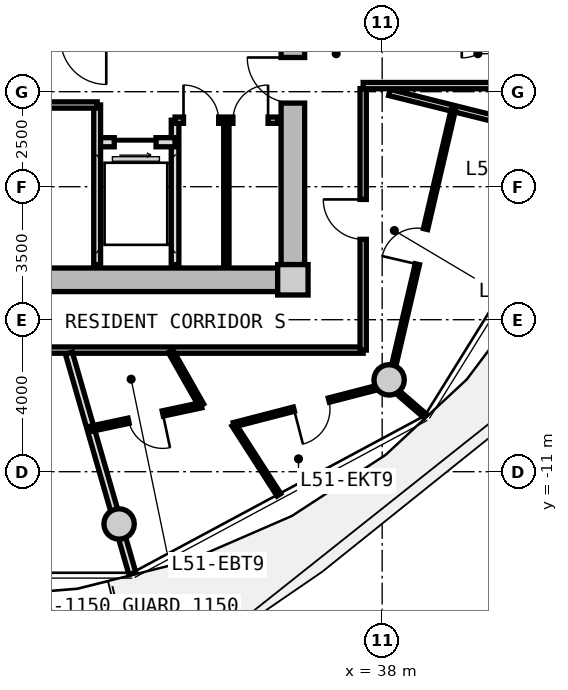
"""IFC4 building model, lengths in metres.
Left out: names, types, materials, properties, quantities, classifications, styles, units other than length and angle.
Written with IfcOpenShell. Run it as: python <this file> out.ifc"""

import sys

from ifc_helpers import new_model, si_unit, direction, frame, frame_2d, origin, origin_2d, place, context, subcontext, project, spatial, rectangle, circle, extrude, source, transform, mapped, element, fill, save


model = new_model("IFC4")
c1 = context("Model", 3, precision=1e-05, world=origin(), true_north=direction((0.0, 1.0)))
c2 = subcontext(c1, "Body", "Model", "MODEL_VIEW")
j1 = project(units=[si_unit("LENGTHUNIT", "METRE"), si_unit("PLANEANGLEUNIT", "RADIAN")], contexts=[c1])
p1 = place(None, origin())
s1 = spatial("IfcSite", under=j1, at=p1, CompositionType="ELEMENT")
p2 = place(p1, origin())
s2 = spatial("IfcBuilding", under=s1, at=p2, CompositionType="ELEMENT")
p3 = place(p2, frame((0.0, 0.0, 164.8)))
s3 = spatial("IfcBuildingStorey", under=s2, at=p3, CompositionType="ELEMENT", Elevation=164.8)
m1 = source(origin(), c2, "Body", "SweptSolid", [
    extrude(rectangle(XDim=0.8, YDim=0.8, at=origin_2d()), origin(), (0.0, 0.0, 1.0), 3.05),
])
p4 = place(p3, frame((35.65, -5.95, 0.0), z_axis=(0.0, 0.0, 1.0), x_axis=(1.0, 0.0, 0.0)))
e1 = element("IfcColumn", 1, at=p4, inside=s3, PredefinedType="COLUMN", context=c2, shape_type="MappedRepresentation", body=[
    mapped(m1, transform((0.0, 0.0, 0.0), x_axis=(1.0, 0.0, 0.0), y_axis=(0.0, 1.0, 0.0), z_axis=(0.0, 0.0, 1.0), scale=1.0)),
])
m2 = source(origin(), c2, "Body", "SweptSolid", [
    extrude(rectangle(XDim=14.5, YDim=0.62, at=frame_2d((7.25, 0.0))), origin(), (0.0, 0.0, 1.0), 2.81),
])
p5 = place(p3, frame((35.25, -5.95, 0.0), z_axis=(0.0, 0.0, 1.0), x_axis=(-1.0, 0.0, 0.0)))
e2 = element("IfcWall", 2, at=p5, inside=s3, PredefinedType="SHEAR", context=c2, shape_type="MappedRepresentation", body=[
    mapped(m2, transform((0.0, 0.0, 0.0), x_axis=(1.0, 0.0, 0.0), y_axis=(0.0, 1.0, 0.0), z_axis=(0.0, 0.0, 1.0), scale=1.0)),
])
m3 = source(origin(), c2, "Body", "SweptSolid", [
    extrude(rectangle(XDim=11.1, YDim=0.62, at=frame_2d((5.55, 0.0))), origin(), (0.0, 0.0, 1.0), 2.81),
])
p6 = place(p3, frame((35.65, 5.55, 0.0), z_axis=(0.0, 0.0, 1.0), x_axis=(0.0, -1.0, 0.0)))
e3 = element("IfcWall", 3, at=p6, inside=s3, PredefinedType="SHEAR", context=c2, shape_type="MappedRepresentation", body=[
    mapped(m3, transform((0.0, 0.0, 0.0), x_axis=(1.0, 0.0, 0.0), y_axis=(0.0, 1.0, 0.0), z_axis=(0.0, 0.0, 1.0), scale=1.0)),
])
p7 = place(p6, frame((5.65, 0.0, 0.0)))
e4 = element("IfcOpeningElement", 4, at=p7, cuts=e3, PredefinedType="OPENING", context=c2, shape_type="SweptSolid", body=[
    extrude(rectangle(XDim=1.2, YDim=2.15, at=frame_2d((0.6, 1.075))), frame((0.0, 0.32, 0.0), z_axis=(0.0, -1.0, 0.0), x_axis=(1.0, 0.0, 0.0)), (0.0, 0.0, 1.0), 0.64),
])
m4 = source(origin(), c2, "Body", "SweptSolid", [
    extrude(circle(Radius=0.4, at=origin_2d()), origin(), (0.0, 0.0, 1.0), 3.05),
])
for number, where, z_axis, x_axis in (
    (5, (31.077, -12.375, 0.0), (0.0, 0.0, 1.0), (1.0, 0.0, 0.0)),
    (6, (38.183, -8.584, 0.0), (0.0, 0.0, 1.0), (1.0, 0.0, 0.0)),
):
    element("IfcColumn", number, at=place(p3, frame(where, z_axis=z_axis, x_axis=x_axis)), inside=s3, PredefinedType="COLUMN", context=c2, shape_type="MappedRepresentation", body=[
        mapped(m4, transform((0.0, 0.0, 0.0), x_axis=(1.0, 0.0, 0.0), y_axis=(0.0, 1.0, 0.0), z_axis=(0.0, 0.0, 1.0), scale=1.0)),
    ])
m5 = source(origin(), c2, "Body", "SweptSolid", [
    extrude(rectangle(XDim=3.8, YDim=0.2, at=frame_2d((1.9, 0.0))), origin(), (0.0, 0.0, 1.0), 2.795),
])
p8 = place(p3, frame((32.55, -5.55, 0.0), z_axis=(0.0, 0.0, 1.0), x_axis=(0.0, 1.0, 0.0)))
e7 = element("IfcWall", 7, at=p8, inside=s3, PredefinedType="PARTITIONING", context=c2, shape_type="MappedRepresentation", body=[
    mapped(m5, transform((0.0, 0.0, 0.0), x_axis=(1.0, 0.0, 0.0), y_axis=(0.0, 1.0, 0.0), z_axis=(0.0, 0.0, 1.0), scale=1.0)),
])
m6 = source(origin(), c2, "Body", "SweptSolid", [
    extrude(rectangle(XDim=2.05, YDim=0.24, at=frame_2d((1.025, 0.0))), origin(), (0.0, 0.0, 1.0), 2.795),
])
p9 = place(p3, frame((30.5, -2.33, 0.0), z_axis=(0.0, 0.0, 1.0), x_axis=(1.0, 0.0, 0.0)))
e8 = element("IfcWall", 8, at=p9, inside=s3, PredefinedType="PARTITIONING", context=c2, shape_type="MappedRepresentation", body=[
    mapped(m6, transform((0.0, 0.0, 0.0), x_axis=(1.0, 0.0, 0.0), y_axis=(0.0, 1.0, 0.0), z_axis=(0.0, 0.0, 1.0), scale=1.0)),
])
p10 = place(p9, frame((0.45, 0.0, 0.0)))
e9 = element("IfcOpeningElement", 9, at=p10, cuts=e8, PredefinedType="OPENING", context=c2, shape_type="SweptSolid", body=[
    extrude(rectangle(XDim=1.1, YDim=2.2, at=frame_2d((0.55, 1.1))), frame((0.0, 0.13, 0.0), z_axis=(0.0, -1.0, 0.0), x_axis=(1.0, 0.0, 0.0)), (0.0, 0.0, 1.0), 0.26),
])
m7 = source(origin(), c2, "Body", "SweptSolid", [
    extrude(rectangle(XDim=4.2, YDim=0.18, at=frame_2d((2.1, 0.0))), origin(), (0.0, 0.0, 1.0), 2.795),
])
p11 = place(p3, frame((30.5, -5.55, 0.0), z_axis=(0.0, 0.0, 1.0), x_axis=(0.0, 1.0, 0.0)))
e10 = element("IfcWall", 10, at=p11, inside=s3, PredefinedType="PARTITIONING", context=c2, shape_type="MappedRepresentation", body=[
    mapped(m7, transform((0.0, 0.0, 0.0), x_axis=(1.0, 0.0, 0.0), y_axis=(0.0, 1.0, 0.0), z_axis=(0.0, 0.0, 1.0), scale=1.0)),
])
m8 = source(origin(), c2, "Body", "SweptSolid", [
    extrude(rectangle(XDim=4.77, YDim=0.165, at=frame_2d((2.385, 0.0))), origin(), (0.0, 0.0, 1.0), 2.795),
])
p12 = place(p3, frame((25.73, -1.35, 0.0), z_axis=(0.0, 0.0, 1.0), x_axis=(1.0, 0.0, 0.0)))
e11 = element("IfcWall", 11, at=p12, inside=s3, PredefinedType="PARTITIONING", context=c2, shape_type="MappedRepresentation", body=[
    mapped(m8, transform((0.0, 0.0, 0.0), x_axis=(1.0, 0.0, 0.0), y_axis=(0.0, 1.0, 0.0), z_axis=(0.0, 0.0, 1.0), scale=1.0)),
])
p13 = place(p12, frame((1.85, 0.0, 0.0)))
e12 = element("IfcOpeningElement", 12, at=p13, cuts=e11, PredefinedType="OPENING", context=c2, shape_type="SweptSolid", body=[
    extrude(rectangle(XDim=1.0, YDim=2.1, at=frame_2d((0.5, 1.05))), frame((0.0, 0.093, 0.0), z_axis=(0.0, -1.0, 0.0), x_axis=(1.0, 0.0, 0.0)), (0.0, 0.0, 1.0), 0.185),
])
m9 = source(origin(), c2, "Body", "SweptSolid", [
    extrude(rectangle(XDim=2.7, YDim=0.165, at=frame_2d((1.35, 0.0))), origin(), (0.0, 0.0, 1.0), 2.795),
])
p14 = place(p3, frame((32.55, -1.75, 0.0), z_axis=(0.0, 0.0, 1.0), x_axis=(1.0, 0.0, 0.0)))
e13 = element("IfcWall", 13, at=p14, inside=s3, PredefinedType="PARTITIONING", context=c2, shape_type="MappedRepresentation", body=[
    mapped(m9, transform((0.0, 0.0, 0.0), x_axis=(1.0, 0.0, 0.0), y_axis=(0.0, 1.0, 0.0), z_axis=(0.0, 0.0, 1.0), scale=1.0)),
])
p15 = place(p14, frame((0.222, 0.0, 0.0)))
e14 = element("IfcOpeningElement", 14, at=p15, cuts=e13, PredefinedType="OPENING", context=c2, shape_type="SweptSolid", body=[
    extrude(rectangle(XDim=0.925, YDim=2.1, at=frame_2d((0.462, 1.05))), frame((0.0, 0.093, 0.0), z_axis=(0.0, -1.0, 0.0), x_axis=(1.0, 0.0, 0.0)), (0.0, 0.0, 1.0), 0.185),
])
p16 = place(p14, frame((1.522, 0.0, 0.0)))
e15 = element("IfcOpeningElement", 15, at=p16, cuts=e13, PredefinedType="OPENING", context=c2, shape_type="SweptSolid", body=[
    extrude(rectangle(XDim=0.925, YDim=2.1, at=frame_2d((0.462, 1.05))), frame((0.0, 0.093, 0.0), z_axis=(0.0, -1.0, 0.0), x_axis=(1.0, 0.0, 0.0)), (0.0, 0.0, 1.0), 0.185),
])
m10 = source(origin(), c2, "Body", "SweptSolid", [
    extrude(rectangle(XDim=3.8, YDim=0.14, at=frame_2d((1.9, 0.0))), origin(), (0.0, 0.0, 1.0), 2.795),
])
p17 = place(p3, frame((33.9, -5.55, 0.0), z_axis=(0.0, 0.0, 1.0), x_axis=(0.0, 1.0, 0.0)))
e16 = element("IfcWall", 16, at=p17, inside=s3, PredefinedType="PARTITIONING", context=c2, shape_type="MappedRepresentation", body=[
    mapped(m10, transform((0.0, 0.0, 0.0), x_axis=(1.0, 0.0, 0.0), y_axis=(0.0, 1.0, 0.0), z_axis=(0.0, 0.0, 1.0), scale=1.0)),
])
m11 = source(origin(), c2, "Body", "SweptSolid", [
    extrude(rectangle(XDim=19.0, YDim=0.165, at=frame_2d((9.5, 0.0))), origin(), (0.0, 0.0, 1.0), 2.795),
])
p18 = place(p3, frame((37.5, -7.8, 0.0), z_axis=(0.0, 0.0, 1.0), x_axis=(-1.0, 0.0, 0.0)))
e17 = element("IfcWall", 17, at=p18, inside=s3, PredefinedType="PARTITIONING", context=c2, shape_type="MappedRepresentation", body=[
    mapped(m11, transform((0.0, 0.0, 0.0), x_axis=(1.0, 0.0, 0.0), y_axis=(0.0, 1.0, 0.0), z_axis=(0.0, 0.0, 1.0), scale=1.0)),
])
p19 = place(p18, frame((12.623, 0.0, 0.0)))
e18 = element("IfcOpeningElement", 18, at=p19, cuts=e17, PredefinedType="OPENING", context=c2, shape_type="SweptSolid", body=[
    extrude(rectangle(XDim=1.25, YDim=2.2, at=frame_2d((0.625, 1.1))), frame((0.0, 0.093, 0.0), z_axis=(0.0, -1.0, 0.0), x_axis=(1.0, 0.0, 0.0)), (0.0, 0.0, 1.0), 0.185),
])
m12 = source(origin(), c2, "Body", "SweptSolid", [
    extrude(rectangle(XDim=6.88, YDim=0.165, at=frame_2d((3.44, 0.0))), origin(), (0.0, 0.0, 1.0), 2.795),
])
p20 = place(p3, frame((37.5, -0.92, 0.0), z_axis=(0.0, 0.0, 1.0), x_axis=(0.0, -1.0, 0.0)))
e19 = element("IfcWall", 19, at=p20, inside=s3, PredefinedType="PARTITIONING", context=c2, shape_type="MappedRepresentation", body=[
    mapped(m12, transform((0.0, 0.0, 0.0), x_axis=(1.0, 0.0, 0.0), y_axis=(0.0, 1.0, 0.0), z_axis=(0.0, 0.0, 1.0), scale=1.0)),
])
p21 = place(p20, frame((2.915, 0.0, 0.0)))
e20 = element("IfcOpeningElement", 20, at=p21, cuts=e19, PredefinedType="OPENING", context=c2, shape_type="SweptSolid", body=[
    extrude(rectangle(XDim=1.05, YDim=2.15, at=frame_2d((0.525, 1.075))), frame((0.0, 0.093, 0.0), z_axis=(0.0, -1.0, 0.0), x_axis=(1.0, 0.0, 0.0)), (0.0, 0.0, 1.0), 0.185),
])
m13 = source(origin(), c2, "Body", "SweptSolid", [
    extrude(rectangle(XDim=5.564, YDim=0.165, at=frame_2d((2.782, 0.0))), origin(), (0.0, 0.0, 1.0), 2.345),
])
p22 = place(p3, frame((38.19, -1.02, 0.0), z_axis=(0.0, 0.0, 1.0), x_axis=(0.97031260977, -0.241854169533, 0.0)))
e21 = element("IfcWall", 21, at=p22, inside=s3, PredefinedType="PARTITIONING", context=c2, shape_type="MappedRepresentation", body=[
    mapped(m13, transform((0.0, 0.0, 0.0), x_axis=(1.0, 0.0, 0.0), y_axis=(0.0, 1.0, 0.0), z_axis=(0.0, 0.0, 1.0), scale=1.0)),
])
m14 = source(origin(), c2, "Body", "SweptSolid", [
    extrude(rectangle(XDim=6.139, YDim=0.165, at=frame_2d((3.069, 0.0))), origin(), (0.0, 0.0, 1.0), 2.795),
])
p23 = place(p3, frame((43.639, -0.84, 0.0), z_axis=(0.0, 0.0, 1.0), x_axis=(-1.0, 0.0, 0.0)))
e22 = element("IfcWall", 22, at=p23, inside=s3, PredefinedType="PARTITIONING", context=c2, shape_type="MappedRepresentation", body=[
    mapped(m14, transform((0.0, 0.0, 0.0), x_axis=(1.0, 0.0, 0.0), y_axis=(0.0, 1.0, 0.0), z_axis=(0.0, 0.0, 1.0), scale=1.0)),
])
m15 = source(origin(), c2, "Body", "SweptSolid", [
    extrude(rectangle(XDim=6.035, YDim=0.19, at=frame_2d((3.018, 0.0))), origin(), (0.0, 0.0, 1.0), 2.345),
])
p24 = place(p3, frame((29.756, -7.88, 0.0), z_axis=(0.0, 0.0, 1.0), x_axis=(0.276809454862, -0.960924828329, 0.0)))
e23 = element("IfcWall", 23, at=p24, inside=s3, PredefinedType="PARTITIONING", context=c2, shape_type="MappedRepresentation", body=[
    mapped(m15, transform((0.0, 0.0, 0.0), x_axis=(1.0, 0.0, 0.0), y_axis=(0.0, 1.0, 0.0), z_axis=(0.0, 0.0, 1.0), scale=1.0)),
])
m16 = source(origin(), c2, "Body", "SweptSolid", [
    extrude(rectangle(XDim=7.469, YDim=0.115, at=frame_2d((3.734, 0.0))), origin(), (0.0, 0.0, 1.0), 2.795),
])
p25 = place(p3, frame((38.187, -8.715, 0.0), z_axis=(0.0, 0.0, 1.0), x_axis=(0.226790420763, 0.973943584121, 0.0)))
e24 = element("IfcWall", 24, at=p25, inside=s3, PredefinedType="PARTITIONING", context=c2, shape_type="MappedRepresentation", body=[
    mapped(m16, transform((0.0, 0.0, 0.0), x_axis=(1.0, 0.0, 0.0), y_axis=(0.0, 1.0, 0.0), z_axis=(0.0, 0.0, 1.0), scale=1.0)),
])
p26 = place(p25, frame((3.259, 0.0, 0.0)))
e25 = element("IfcOpeningElement", 25, at=p26, cuts=e24, PredefinedType="OPENING", context=c2, shape_type="SweptSolid", body=[
    extrude(rectangle(XDim=0.95, YDim=2.1, at=frame_2d((0.475, 1.05))), frame((0.0, 0.067, 0.0), z_axis=(0.0, -1.0, 0.0), x_axis=(1.0, 0.0, 0.0)), (0.0, 0.0, 1.0), 0.135),
])
m17 = source(origin(), c2, "Body", "SweptSolid", [
    extrude(rectangle(XDim=1.258, YDim=0.115, at=frame_2d((0.629, 0.0))), origin(), (0.0, 0.0, 1.0), 2.795),
])
p27 = place(p3, frame((38.187, -8.715, 0.0), z_axis=(0.0, 0.0, 1.0), x_axis=(0.755765923317, -0.654841865761, 0.0)))
e26 = element("IfcWall", 26, at=p27, inside=s3, PredefinedType="PARTITIONING", context=c2, shape_type="MappedRepresentation", body=[
    mapped(m17, transform((0.0, 0.0, 0.0), x_axis=(1.0, 0.0, 0.0), y_axis=(0.0, 1.0, 0.0), z_axis=(0.0, 0.0, 1.0), scale=1.0)),
])
m18 = source(origin(), c2, "Body", "SweptSolid", [
    extrude(rectangle(XDim=1.635, YDim=0.14, at=frame_2d((0.817, 0.0))), origin(), (0.0, 0.0, 1.0), 2.795),
])
p28 = place(p3, frame((32.434, -7.83, 0.0), z_axis=(0.0, 0.0, 1.0), x_axis=(0.494078690764, -0.869417188312, 0.0)))
e27 = element("IfcWall", 27, at=p28, inside=s3, PredefinedType="PARTITIONING", context=c2, shape_type="MappedRepresentation", body=[
    mapped(m18, transform((0.0, 0.0, 0.0), x_axis=(1.0, 0.0, 0.0), y_axis=(0.0, 1.0, 0.0), z_axis=(0.0, 0.0, 1.0), scale=1.0)),
])
m19 = source(origin(), c2, "Body", "SweptSolid", [
    extrude(rectangle(XDim=2.995, YDim=0.14, at=frame_2d((1.498, 0.0))), origin(), (0.0, 0.0, 1.0), 2.435),
])
p29 = place(p3, frame((33.241, -9.251, 0.0), z_axis=(0.0, 0.0, 1.0), x_axis=(-0.978075914325, -0.208248663425, 0.0)))
e28 = element("IfcWall", 28, at=p29, inside=s3, PredefinedType="PARTITIONING", context=c2, shape_type="MappedRepresentation", body=[
    mapped(m19, transform((0.0, 0.0, 0.0), x_axis=(1.0, 0.0, 0.0), y_axis=(0.0, 1.0, 0.0), z_axis=(0.0, 0.0, 1.0), scale=1.0)),
])
p30 = place(p29, frame((1.038, 0.0, 0.0)))
e29 = element("IfcOpeningElement", 29, at=p30, cuts=e28, PredefinedType="OPENING", context=c2, shape_type="SweptSolid", body=[
    extrude(rectangle(XDim=0.92, YDim=2.1, at=frame_2d((0.46, 1.05))), frame((0.0, 0.08, 0.0), z_axis=(0.0, -1.0, 0.0), x_axis=(1.0, 0.0, 0.0)), (0.0, 0.0, 1.0), 0.16),
])
m20 = source(origin(), c2, "Body", "SweptSolid", [
    extrude(rectangle(XDim=2.194, YDim=0.115, at=frame_2d((1.097, 0.0))), origin(), (0.0, 0.0, 1.0), 2.795),
])
p31 = place(p3, frame((34.095, -9.764, 0.0), z_axis=(0.0, 0.0, 1.0), x_axis=(0.540858831194, -0.841113383985, 0.0)))
e30 = element("IfcWall", 30, at=p31, inside=s3, PredefinedType="PARTITIONING", context=c2, shape_type="MappedRepresentation", body=[
    mapped(m20, transform((0.0, 0.0, 0.0), x_axis=(1.0, 0.0, 0.0), y_axis=(0.0, 1.0, 0.0), z_axis=(0.0, 0.0, 1.0), scale=1.0)),
])
m21 = source(origin(), c2, "Body", "SweptSolid", [
    extrude(rectangle(XDim=4.218, YDim=0.115, at=frame_2d((2.109, 0.0))), origin(), (0.0, 0.0, 1.0), 2.345),
])
p32 = place(p3, frame((34.095, -9.764, 0.0), z_axis=(0.0, 0.0, 1.0), x_axis=(0.968124892577, 0.250467946797, 0.0)))
e31 = element("IfcWall", 31, at=p32, inside=s3, PredefinedType="PARTITIONING", context=c2, shape_type="MappedRepresentation", body=[
    mapped(m21, transform((0.0, 0.0, 0.0), x_axis=(1.0, 0.0, 0.0), y_axis=(0.0, 1.0, 0.0), z_axis=(0.0, 0.0, 1.0), scale=1.0)),
])
p33 = place(p32, frame((1.634, 0.0, 0.0)))
e32 = element("IfcOpeningElement", 32, at=p33, cuts=e31, PredefinedType="OPENING", context=c2, shape_type="SweptSolid", body=[
    extrude(rectangle(XDim=0.95, YDim=2.1, at=frame_2d((0.475, 1.05))), frame((0.0, 0.067, 0.0), z_axis=(0.0, -1.0, 0.0), x_axis=(1.0, 0.0, 0.0)), (0.0, 0.0, 1.0), 0.135),
])
m22 = source(origin(), c2, "Body", "SweptSolid", [
    extrude(rectangle(XDim=1.2, YDim=2.15, at=frame_2d((0.6, 1.075))), frame((0.0, 0.025, 0.0), z_axis=(0.0, -1.0, 0.0), x_axis=(1.0, 0.0, 0.0)), (0.0, 0.0, 1.0), 0.05),
])
p34 = place(p7, frame((1.2, 0.0, 0.0), z_axis=(0.0, 0.0, 1.0), x_axis=(-1.0, 0.0, 0.0)))
e33 = element("IfcDoor", 33, at=p34, inside=s3, OperationType="SINGLE_SWING_RIGHT", PredefinedType="DOOR", context=c2, shape_type="MappedRepresentation", body=[
    mapped(m22, transform((0.0, 0.0, 0.0), x_axis=(1.0, 0.0, 0.0), y_axis=(0.0, 1.0, 0.0), z_axis=(0.0, 0.0, 1.0), scale=1.0)),
])
fill(e4, e33)
m23 = source(origin(), c2, "Body", "SweptSolid", [
    extrude(rectangle(XDim=1.1, YDim=2.2, at=frame_2d((0.55, 1.1))), frame((0.0, 0.025, 0.0), z_axis=(0.0, -1.0, 0.0), x_axis=(1.0, 0.0, 0.0)), (0.0, 0.0, 1.0), 0.05),
])
p35 = place(p10, frame((1.1, 0.0, 0.0), z_axis=(0.0, 0.0, 1.0), x_axis=(-1.0, 0.0, 0.0)))
e34 = element("IfcDoor", 34, at=p35, inside=s3, OperationType="SLIDING_TO_RIGHT", PredefinedType="DOOR", context=c2, shape_type="MappedRepresentation", body=[
    mapped(m23, transform((0.0, 0.0, 0.0), x_axis=(1.0, 0.0, 0.0), y_axis=(0.0, 1.0, 0.0), z_axis=(0.0, 0.0, 1.0), scale=1.0)),
])
fill(e9, e34)
m24 = source(origin(), c2, "Body", "SweptSolid", [
    extrude(rectangle(XDim=0.925, YDim=2.1, at=frame_2d((0.462, 1.05))), frame((0.0, 0.025, 0.0), z_axis=(0.0, -1.0, 0.0), x_axis=(1.0, 0.0, 0.0)), (0.0, 0.0, 1.0), 0.05),
])
p36 = place(p15, origin())
e35 = element("IfcDoor", 35, at=p36, inside=s3, OperationType="SINGLE_SWING_LEFT", PredefinedType="DOOR", context=c2, shape_type="MappedRepresentation", body=[
    mapped(m24, transform((0.0, 0.0, 0.0), x_axis=(1.0, 0.0, 0.0), y_axis=(0.0, 1.0, 0.0), z_axis=(0.0, 0.0, 1.0), scale=1.0)),
])
fill(e14, e35)
p37 = place(p16, origin())
e36 = element("IfcDoor", 36, at=p37, inside=s3, OperationType="SINGLE_SWING_RIGHT", PredefinedType="DOOR", context=c2, shape_type="MappedRepresentation", body=[
    mapped(m24, transform((0.0, 0.0, 0.0), x_axis=(1.0, 0.0, 0.0), y_axis=(0.0, 1.0, 0.0), z_axis=(0.0, 0.0, 1.0), scale=1.0)),
])
fill(e15, e36)
m25 = source(origin(), c2, "Body", "SweptSolid", [
    extrude(rectangle(XDim=1.05, YDim=2.15, at=frame_2d((0.525, 1.075))), frame((0.0, 0.025, 0.0), z_axis=(0.0, -1.0, 0.0), x_axis=(1.0, 0.0, 0.0)), (0.0, 0.0, 1.0), 0.05),
])
p38 = place(p21, frame((1.05, 0.0, 0.0), z_axis=(0.0, 0.0, 1.0), x_axis=(-1.0, 0.0, 0.0)))
e37 = element("IfcDoor", 37, at=p38, inside=s3, OperationType="SINGLE_SWING_RIGHT", PredefinedType="DOOR", context=c2, shape_type="MappedRepresentation", body=[
    mapped(m25, transform((0.0, 0.0, 0.0), x_axis=(1.0, 0.0, 0.0), y_axis=(0.0, 1.0, 0.0), z_axis=(0.0, 0.0, 1.0), scale=1.0)),
])
fill(e20, e37)
m26 = source(origin(), c2, "Body", "SweptSolid", [
    extrude(rectangle(XDim=0.92, YDim=2.1, at=frame_2d((0.46, 1.05))), frame((0.0, 0.025, 0.0), z_axis=(0.0, -1.0, 0.0), x_axis=(1.0, 0.0, 0.0)), (0.0, 0.0, 1.0), 0.05),
])
p39 = place(p30, origin())
e38 = element("IfcDoor", 38, at=p39, inside=s3, OperationType="SINGLE_SWING_LEFT", PredefinedType="DOOR", context=c2, shape_type="MappedRepresentation", body=[
    mapped(m26, transform((0.0, 0.0, 0.0), x_axis=(1.0, 0.0, 0.0), y_axis=(0.0, 1.0, 0.0), z_axis=(0.0, 0.0, 1.0), scale=1.0)),
])
fill(e29, e38)
m27 = source(origin(), c2, "Body", "SweptSolid", [
    extrude(rectangle(XDim=0.95, YDim=2.1, at=frame_2d((0.475, 1.05))), frame((0.0, 0.025, 0.0), z_axis=(0.0, -1.0, 0.0), x_axis=(1.0, 0.0, 0.0)), (0.0, 0.0, 1.0), 0.05),
])
p40 = place(p33, frame((0.95, 0.0, 0.0), z_axis=(0.0, 0.0, 1.0), x_axis=(-1.0, 0.0, 0.0)))
e39 = element("IfcDoor", 39, at=p40, inside=s3, OperationType="SINGLE_SWING_RIGHT", PredefinedType="DOOR", context=c2, shape_type="MappedRepresentation", body=[
    mapped(m27, transform((0.0, 0.0, 0.0), x_axis=(1.0, 0.0, 0.0), y_axis=(0.0, 1.0, 0.0), z_axis=(0.0, 0.0, 1.0), scale=1.0)),
])
fill(e32, e39)
p41 = place(p26, origin())
e40 = element("IfcDoor", 40, at=p41, inside=s3, OperationType="SINGLE_SWING_LEFT", PredefinedType="DOOR", context=c2, shape_type="MappedRepresentation", body=[
    mapped(m27, transform((0.0, 0.0, 0.0), x_axis=(1.0, 0.0, 0.0), y_axis=(0.0, 1.0, 0.0), z_axis=(0.0, 0.0, 1.0), scale=1.0)),
])
fill(e25, e40)
save(model, sys.argv[1])
